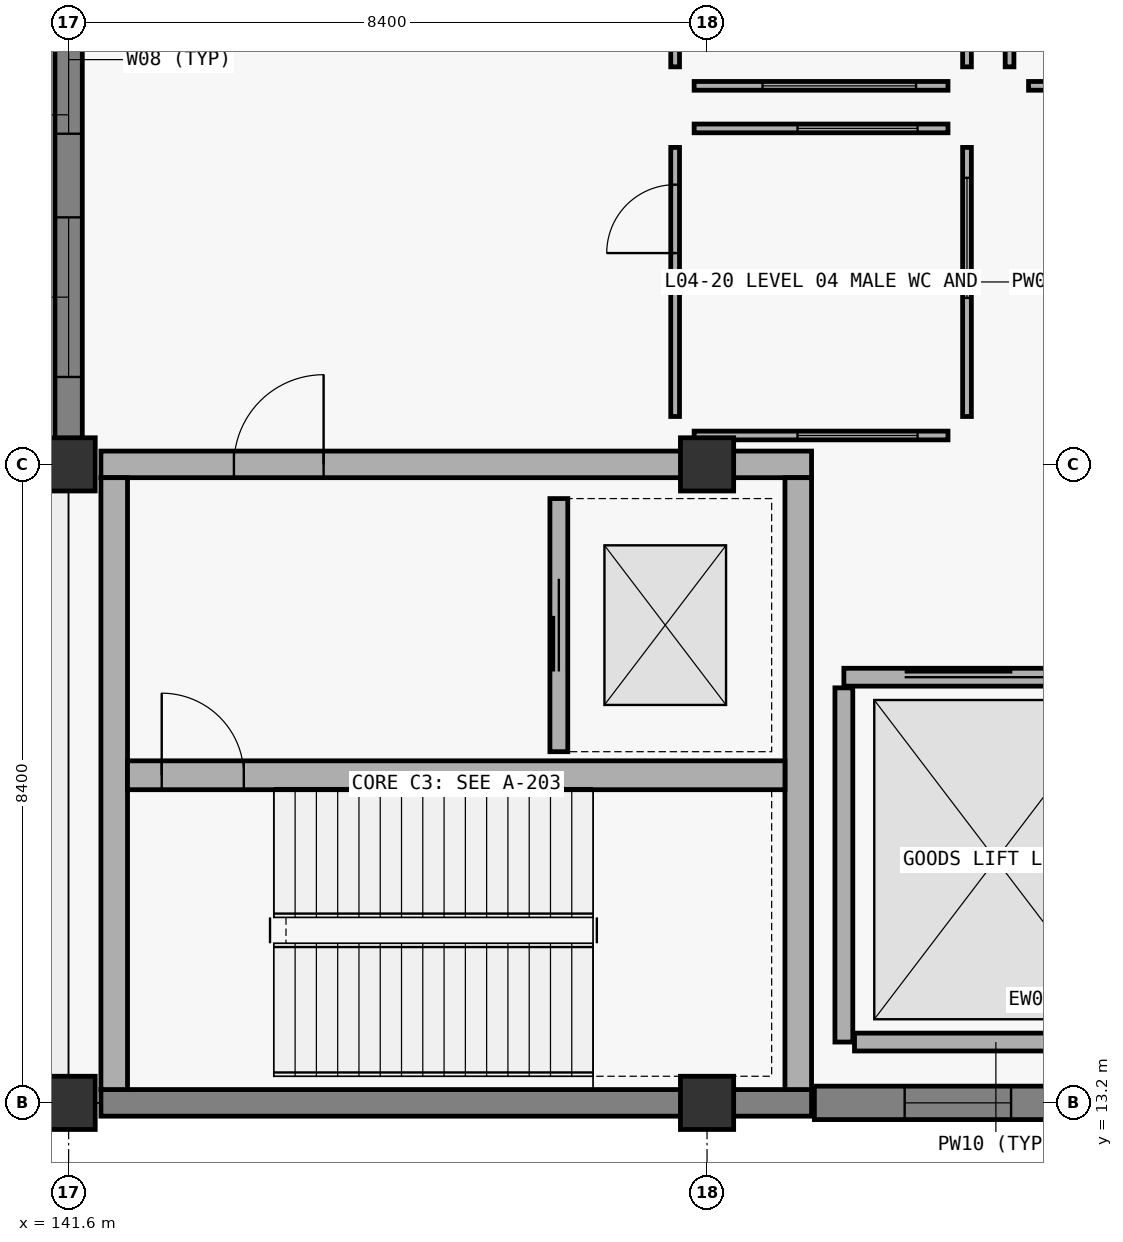
"""IFC4 building model, lengths in metres.
Left out: names, types, materials, properties, quantities, classifications, styles, units other than length and angle.
Written with IfcOpenShell. Run it as: python <this file> out.ifc"""

import sys

from ifc_helpers import new_model, si_unit, direction, frame, frame_2d, origin, origin_2d, place, context, subcontext, project, spatial, rectangle, extrude, element, fill, save


model = new_model("IFC4")
c1 = context("Model", 3, precision=1e-05, world=origin(), true_north=direction((0.0, 1.0)))
c2 = subcontext(c1, "Body", "Model", "MODEL_VIEW")
j1 = project(units=[si_unit("LENGTHUNIT", "METRE"), si_unit("PLANEANGLEUNIT", "RADIAN")], contexts=[c1])
p1 = place(None, origin())
s1 = spatial("IfcSite", under=j1, at=p1, CompositionType="ELEMENT")
p2 = place(p1, origin())
s2 = spatial("IfcBuilding", under=s1, at=p2, CompositionType="ELEMENT")
p3 = place(p2, frame((0.0, 0.0, 20.7)))
s3 = spatial("IfcBuildingStorey", under=s2, at=p3, CompositionType="ELEMENT", Elevation=20.7)
for number, where, z_axis, x_axis in (
    (1, (141.6, 13.2, 0.0), (0.0, 0.0, 1.0), (1.0, 0.0, 0.0)),
    (2, (141.6, 21.6, 0.0), (0.0, 0.0, 1.0), (1.0, 0.0, 0.0)),
    (3, (150.0, 13.2, 0.0), (0.0, 0.0, 1.0), (1.0, 0.0, 0.0)),
    (4, (150.0, 21.6, 0.0), (0.0, 0.0, 1.0), (1.0, 0.0, 0.0)),
):
    element("IfcColumn", number, at=place(p3, frame(where, z_axis=z_axis, x_axis=x_axis)), inside=s3, PredefinedType="COLUMN", context=c2, shape_type="SweptSolid", body=[
        extrude(rectangle(XDim=0.7, YDim=0.7, at=origin_2d()), origin(), (0.0, 0.0, 1.0), 5.7),
    ])
p4 = place(p3, frame((151.375, 13.2, 0.0), z_axis=(0.0, 0.0, 1.0), x_axis=(-1.0, 0.0, 0.0)))
e5 = element("IfcWall", 5, at=p4, inside=s3, PredefinedType="SHEAR", context=c2, shape_type="SweptSolid", body=[
    extrude(rectangle(XDim=9.35, YDim=0.35, at=frame_2d((4.675, 0.0))), origin(), (0.0, 0.0, 1.0), 5.7),
])
p5 = place(p3, frame((142.025, 21.6, 0.0), z_axis=(0.0, 0.0, 1.0), x_axis=(1.0, 0.0, 0.0)))
e6 = element("IfcWall", 6, at=p5, inside=s3, PredefinedType="SHEAR", context=c2, shape_type="SweptSolid", body=[
    extrude(rectangle(XDim=9.35, YDim=0.35, at=frame_2d((4.675, 0.0))), origin(), (0.0, 0.0, 1.0), 5.7),
])
p6 = place(p5, frame((1.75, 0.0, 0.0)))
e7 = element("IfcOpeningElement", 7, at=p6, cuts=e6, PredefinedType="OPENING", context=c2, shape_type="SweptSolid", body=[
    extrude(rectangle(XDim=1.18, YDim=2.24, at=frame_2d((0.59, 1.12))), frame((0.0, 0.185, 0.0), z_axis=(0.0, -1.0, 0.0), x_axis=(1.0, 0.0, 0.0)), (0.0, 0.0, 1.0), 0.37),
])
for number, where, z_axis, x_axis in (
    (8, (142.2, 13.375, 0.0), (0.0, 0.0, 1.0), (0.0, 1.0, 0.0)),
    (9, (151.2, 13.375, 0.0), (0.0, 0.0, 1.0), (0.0, 1.0, 0.0)),
):
    element("IfcWall", number, at=place(p3, frame(where, z_axis=z_axis, x_axis=x_axis)), inside=s3, PredefinedType="SHEAR", context=c2, shape_type="SweptSolid", body=[
        extrude(rectangle(XDim=8.05, YDim=0.35, at=frame_2d((4.025, 0.0))), origin(), (0.0, 0.0, 1.0), 5.7),
    ])
p7 = place(p3, frame((142.375, 17.51, 0.0), z_axis=(0.0, 0.0, 1.0), x_axis=(1.0, 0.0, 0.0)))
e10 = element("IfcWall", 10, at=p7, inside=s3, PredefinedType="SHEAR", context=c2, shape_type="SweptSolid", body=[
    extrude(rectangle(XDim=8.65, YDim=0.38, at=frame_2d((4.325, 0.0))), origin(), (0.0, 0.0, 1.0), 5.7),
])
p8 = place(p7, frame((0.45, 0.0, 0.0)))
e11 = element("IfcOpeningElement", 11, at=p8, cuts=e10, PredefinedType="OPENING", context=c2, shape_type="SweptSolid", body=[
    extrude(rectangle(XDim=1.08, YDim=2.18, at=frame_2d((0.54, 1.09))), frame((0.0, 0.2, 0.0), z_axis=(0.0, -1.0, 0.0), x_axis=(1.0, 0.0, 0.0)), (0.0, 0.0, 1.0), 0.4),
])
p9 = place(p3, frame((151.412, 13.2, 0.0), z_axis=(0.0, 0.0, 1.0), x_axis=(1.0, 0.0, 0.0)))
e12 = element("IfcWall", 12, at=p9, inside=s3, PredefinedType="SOLIDWALL", context=c2, shape_type="SweptSolid", body=[
    extrude(rectangle(XDim=6.636, YDim=0.44, at=frame_2d((3.318, 0.0))), origin(), (0.0, 0.0, 1.0), 4.66),
])
p10 = place(p9, frame((1.188, 0.0, 0.9)))
e13 = element("IfcOpeningElement", 13, at=p10, cuts=e12, PredefinedType="OPENING", context=c2, shape_type="SweptSolid", body=[
    extrude(rectangle(XDim=1.4, YDim=2.2, at=frame_2d((0.7, 1.1))), frame((0.0, 0.23, 0.0), z_axis=(0.0, -1.0, 0.0), x_axis=(1.0, 0.0, 0.0)), (0.0, 0.0, 1.0), 0.46),
])
p11 = place(p9, frame((4.388, 0.0, 0.9)))
e14 = element("IfcOpeningElement", 14, at=p11, cuts=e12, PredefinedType="OPENING", context=c2, shape_type="SweptSolid", body=[
    extrude(rectangle(XDim=1.25, YDim=2.05, at=frame_2d((0.625, 1.025))), frame((0.0, 0.23, 0.0), z_axis=(0.0, -1.0, 0.0), x_axis=(1.0, 0.0, 0.0)), (0.0, 0.0, 1.0), 0.46),
])
p12 = place(p3, frame((141.6, 21.55, 0.0), z_axis=(0.0, 0.0, 1.0), x_axis=(0.0, 1.0, 0.0)))
e15 = element("IfcWall", 15, at=p12, inside=s3, PredefinedType="SOLIDWALL", context=c2, shape_type="SweptSolid", body=[
    extrude(rectangle(XDim=9.298, YDim=0.36, at=frame_2d((4.649, 0.0))), origin(), (0.0, 0.0, 1.0), 4.66),
])
p13 = place(p12, frame((1.2, 0.0, 0.85)))
e16 = element("IfcOpeningElement", 16, at=p13, cuts=e15, PredefinedType="OPENING", context=c2, shape_type="SweptSolid", body=[
    extrude(rectangle(XDim=2.1, YDim=2.4, at=frame_2d((1.05, 1.2))), frame((0.0, 0.19, 0.0), z_axis=(0.0, -1.0, 0.0), x_axis=(1.0, 0.0, 0.0)), (0.0, 0.0, 1.0), 0.38),
])
p14 = place(p12, frame((4.4, 0.0, 0.85)))
e17 = element("IfcOpeningElement", 17, at=p14, cuts=e15, PredefinedType="OPENING", context=c2, shape_type="SweptSolid", body=[
    extrude(rectangle(XDim=1.95, YDim=2.3, at=frame_2d((0.975, 1.15))), frame((0.0, 0.19, 0.0), z_axis=(0.0, -1.0, 0.0), x_axis=(1.0, 0.0, 0.0)), (0.0, 0.0, 1.0), 0.38),
])
p15 = place(p3, frame((148.05, 17.82, 0.0), z_axis=(0.0, 0.0, 1.0), x_axis=(0.0, 1.0, 0.0)))
e18 = element("IfcWall", 18, at=p15, inside=s3, PredefinedType="PARTITIONING", context=c2, shape_type="SweptSolid", body=[
    extrude(rectangle(XDim=3.33, YDim=0.235, at=frame_2d((1.665, 0.0))), origin(), (0.0, 0.0, 1.0), 4.98),
])
p16 = place(p15, frame((1.055, 0.0, 0.0)))
e19 = element("IfcOpeningElement", 19, at=p16, cuts=e18, PredefinedType="OPENING", context=c2, shape_type="SweptSolid", body=[
    extrude(rectangle(XDim=1.22, YDim=2.24, at=frame_2d((0.61, 1.12))), frame((0.0, 0.127, 0.0), z_axis=(0.0, -1.0, 0.0), x_axis=(1.0, 0.0, 0.0)), (0.0, 0.0, 1.0), 0.255),
])
p17 = place(p3, frame((151.8, 18.8, 0.0), z_axis=(0.0, 0.0, 1.0), x_axis=(1.0, 0.0, 0.0)))
e20 = element("IfcWall", 20, at=p17, inside=s3, PredefinedType="PARTITIONING", context=c2, shape_type="SweptSolid", body=[
    extrude(rectangle(XDim=4.0, YDim=0.235, at=frame_2d((2.0, 0.0))), origin(), (0.0, 0.0, 1.0), 4.98),
])
p18 = place(p17, frame((0.8, 0.0, 0.0)))
e21 = element("IfcOpeningElement", 21, at=p18, cuts=e20, PredefinedType="OPENING", context=c2, shape_type="SweptSolid", body=[
    extrude(rectangle(XDim=2.36, YDim=2.78, at=frame_2d((1.18, 1.39))), frame((0.0, 0.127, 0.0), z_axis=(0.0, -1.0, 0.0), x_axis=(1.0, 0.0, 0.0)), (0.0, 0.0, 1.0), 0.255),
])
p19 = place(p3, frame((151.8, 14.0, 0.0), z_axis=(0.0, 0.0, 1.0), x_axis=(0.0, 1.0, 0.0)))
e22 = element("IfcWall", 22, at=p19, inside=s3, PredefinedType="PARTITIONING", context=c2, shape_type="SweptSolid", body=[
    extrude(rectangle(XDim=4.66, YDim=0.235, at=frame_2d((2.33, 0.0))), origin(), (0.0, 0.0, 1.0), 4.98),
])
p20 = place(p3, frame((151.94, 14.0, 0.0), z_axis=(0.0, 0.0, 1.0), x_axis=(1.0, 0.0, 0.0)))
e23 = element("IfcWall", 23, at=p20, inside=s3, PredefinedType="PARTITIONING", context=c2, shape_type="SweptSolid", body=[
    extrude(rectangle(XDim=3.72, YDim=0.235, at=frame_2d((1.86, 0.0))), origin(), (0.0, 0.0, 1.0), 4.98),
])
p21 = place(p3, frame((149.58, 22.23, 0.0), z_axis=(0.0, 0.0, 1.0), x_axis=(0.0, 1.0, 0.0)))
e24 = element("IfcWall", 24, at=p21, inside=s3, PredefinedType="PARTITIONING", context=c2, shape_type="SweptSolid", body=[
    extrude(rectangle(XDim=3.54, YDim=0.115, at=frame_2d((1.77, 0.0))), origin(), (0.0, 0.0, 1.0), 4.98),
])
p22 = place(p21, frame((2.15, 0.0, 0.0)))
e25 = element("IfcOpeningElement", 25, at=p22, cuts=e24, PredefinedType="OPENING", context=c2, shape_type="SweptSolid", body=[
    extrude(rectangle(XDim=0.9, YDim=2.1, at=frame_2d((0.45, 1.05))), frame((0.0, 0.067, 0.0), z_axis=(0.0, -1.0, 0.0), x_axis=(1.0, 0.0, 0.0)), (0.0, 0.0, 1.0), 0.135),
])
p23 = place(p3, frame((149.83, 21.98, 0.0), z_axis=(0.0, 0.0, 1.0), x_axis=(1.0, 0.0, 0.0)))
e26 = element("IfcWall", 26, at=p23, inside=s3, PredefinedType="PARTITIONING", context=c2, shape_type="SweptSolid", body=[
    extrude(rectangle(XDim=3.34, YDim=0.115, at=frame_2d((1.67, 0.0))), origin(), (0.0, 0.0, 1.0), 4.66),
])
p24 = place(p23, frame((1.36, 0.0, 0.9)))
e27 = element("IfcOpeningElement", 27, at=p24, cuts=e26, PredefinedType="OPENING", context=c2, shape_type="SweptSolid", body=[
    extrude(rectangle(XDim=1.58, YDim=1.24, at=frame_2d((0.79, 0.62))), frame((0.0, 0.067, 0.0), z_axis=(0.0, -1.0, 0.0), x_axis=(1.0, 0.0, 0.0)), (0.0, 0.0, 1.0), 0.135),
])
p25 = place(p3, frame((149.83, 26.02, 0.0), z_axis=(0.0, 0.0, 1.0), x_axis=(1.0, 0.0, 0.0)))
e28 = element("IfcWall", 28, at=p25, inside=s3, PredefinedType="PARTITIONING", context=c2, shape_type="SweptSolid", body=[
    extrude(rectangle(XDim=3.34, YDim=0.115, at=frame_2d((1.67, 0.0))), origin(), (0.0, 0.0, 1.0), 4.66),
])
p26 = place(p25, frame((1.36, 0.0, 0.9)))
e29 = element("IfcOpeningElement", 29, at=p26, cuts=e28, PredefinedType="OPENING", context=c2, shape_type="SweptSolid", body=[
    extrude(rectangle(XDim=1.58, YDim=1.24, at=frame_2d((0.79, 0.62))), frame((0.0, 0.067, 0.0), z_axis=(0.0, -1.0, 0.0), x_axis=(1.0, 0.0, 0.0)), (0.0, 0.0, 1.0), 0.135),
])
p27 = place(p3, frame((153.42, 22.23, 0.0), z_axis=(0.0, 0.0, 1.0), x_axis=(0.0, 1.0, 0.0)))
e30 = element("IfcWall", 30, at=p27, inside=s3, PredefinedType="PARTITIONING", context=c2, shape_type="SweptSolid", body=[
    extrude(rectangle(XDim=3.54, YDim=0.115, at=frame_2d((1.77, 0.0))), origin(), (0.0, 0.0, 1.0), 4.98),
])
p28 = place(p27, frame((1.56, 0.0, 0.9)))
e31 = element("IfcOpeningElement", 31, at=p28, cuts=e30, PredefinedType="OPENING", context=c2, shape_type="SweptSolid", body=[
    extrude(rectangle(XDim=1.58, YDim=1.24, at=frame_2d((0.79, 0.62))), frame((0.0, 0.067, 0.0), z_axis=(0.0, -1.0, 0.0), x_axis=(1.0, 0.0, 0.0)), (0.0, 0.0, 1.0), 0.135),
])
p29 = place(p3, frame((149.58, 26.83, 0.0), z_axis=(0.0, 0.0, 1.0), x_axis=(0.0, 1.0, 0.0)))
e32 = element("IfcWall", 32, at=p29, inside=s3, PredefinedType="PARTITIONING", context=c2, shape_type="SweptSolid", body=[
    extrude(rectangle(XDim=3.74, YDim=0.115, at=frame_2d((1.87, 0.0))), origin(), (0.0, 0.0, 1.0), 4.98),
])
p30 = place(p29, frame((0.4, 0.0, 0.0)))
e33 = element("IfcOpeningElement", 33, at=p30, cuts=e32, PredefinedType="OPENING", context=c2, shape_type="SweptSolid", body=[
    extrude(rectangle(XDim=0.9, YDim=2.1, at=frame_2d((0.45, 1.05))), frame((0.0, 0.067, 0.0), z_axis=(0.0, -1.0, 0.0), x_axis=(1.0, 0.0, 0.0)), (0.0, 0.0, 1.0), 0.135),
])
p31 = place(p3, frame((149.83, 26.58, 0.0), z_axis=(0.0, 0.0, 1.0), x_axis=(1.0, 0.0, 0.0)))
e34 = element("IfcWall", 34, at=p31, inside=s3, PredefinedType="PARTITIONING", context=c2, shape_type="SweptSolid", body=[
    extrude(rectangle(XDim=3.34, YDim=0.115, at=frame_2d((1.67, 0.0))), origin(), (0.0, 0.0, 1.0), 4.66),
])
p32 = place(p31, frame((0.9, 0.0, 0.9)))
e35 = element("IfcOpeningElement", 35, at=p32, cuts=e34, PredefinedType="OPENING", context=c2, shape_type="SweptSolid", body=[
    extrude(rectangle(XDim=2.02, YDim=1.32, at=frame_2d((1.01, 0.66))), frame((0.0, 0.067, 0.0), z_axis=(0.0, -1.0, 0.0), x_axis=(1.0, 0.0, 0.0)), (0.0, 0.0, 1.0), 0.135),
])
p33 = place(p3, frame((153.42, 26.83, 0.0), z_axis=(0.0, 0.0, 1.0), x_axis=(0.0, 1.0, 0.0)))
e36 = element("IfcWall", 36, at=p33, inside=s3, PredefinedType="PARTITIONING", context=c2, shape_type="SweptSolid", body=[
    extrude(rectangle(XDim=3.74, YDim=0.115, at=frame_2d((1.87, 0.0))), origin(), (0.0, 0.0, 1.0), 4.98),
])
p34 = place(p33, frame((0.4, 0.0, 0.9)))
e37 = element("IfcOpeningElement", 37, at=p34, cuts=e36, PredefinedType="OPENING", context=c2, shape_type="SweptSolid", body=[
    extrude(rectangle(XDim=2.02, YDim=1.32, at=frame_2d((1.01, 0.66))), frame((0.0, 0.067, 0.0), z_axis=(0.0, -1.0, 0.0), x_axis=(1.0, 0.0, 0.0)), (0.0, 0.0, 1.0), 0.135),
])
p35 = place(p3, frame((154.23, 26.58, 0.0), z_axis=(0.0, 0.0, 1.0), x_axis=(1.0, 0.0, 0.0)))
e38 = element("IfcWall", 38, at=p35, inside=s3, PredefinedType="PARTITIONING", context=c2, shape_type="SweptSolid", body=[
    extrude(rectangle(XDim=3.34, YDim=0.115, at=frame_2d((1.67, 0.0))), origin(), (0.0, 0.0, 1.0), 4.98),
])
p36 = place(p35, frame((0.4, 0.0, 0.9)))
e39 = element("IfcOpeningElement", 39, at=p36, cuts=e38, PredefinedType="OPENING", context=c2, shape_type="SweptSolid", body=[
    extrude(rectangle(XDim=1.48, YDim=1.35, at=frame_2d((0.74, 0.675))), frame((0.0, 0.067, 0.0), z_axis=(0.0, -1.0, 0.0), x_axis=(1.0, 0.0, 0.0)), (0.0, 0.0, 1.0), 0.135),
])
p37 = place(p3, frame((153.98, 26.83, 0.0), z_axis=(0.0, 0.0, 1.0), x_axis=(0.0, 1.0, 0.0)))
e40 = element("IfcWall", 40, at=p37, inside=s3, PredefinedType="PARTITIONING", context=c2, shape_type="SweptSolid", body=[
    extrude(rectangle(XDim=3.74, YDim=0.115, at=frame_2d((1.87, 0.0))), origin(), (0.0, 0.0, 1.0), 4.98),
])
p38 = place(p37, frame((0.4, 0.0, 0.9)))
e41 = element("IfcOpeningElement", 41, at=p38, cuts=e40, PredefinedType="OPENING", context=c2, shape_type="SweptSolid", body=[
    extrude(rectangle(XDim=1.48, YDim=1.35, at=frame_2d((0.74, 0.675))), frame((0.0, 0.067, 0.0), z_axis=(0.0, -1.0, 0.0), x_axis=(1.0, 0.0, 0.0)), (0.0, 0.0, 1.0), 0.135),
])
p39 = place(p10, origin())
e42 = element("IfcWindow", 42, at=p39, inside=s3, PartitioningType="SINGLE_PANEL", PredefinedType="WINDOW", context=c2, shape_type="SweptSolid", body=[
    extrude(rectangle(XDim=1.4, YDim=2.2, at=frame_2d((0.7, 1.1))), frame((0.0, 0.03, 0.0), z_axis=(0.0, -1.0, 0.0), x_axis=(1.0, 0.0, 0.0)), (0.0, 0.0, 1.0), 0.06),
])
fill(e13, e42)
p40 = place(p13, origin())
e43 = element("IfcWindow", 43, at=p40, inside=s3, PartitioningType="SINGLE_PANEL", PredefinedType="WINDOW", context=c2, shape_type="SweptSolid", body=[
    extrude(rectangle(XDim=2.1, YDim=2.4, at=frame_2d((1.05, 1.2))), frame((0.0, 0.03, 0.0), z_axis=(0.0, -1.0, 0.0), x_axis=(1.0, 0.0, 0.0)), (0.0, 0.0, 1.0), 0.06),
])
fill(e16, e43)
p41 = place(p14, origin())
e44 = element("IfcWindow", 44, at=p41, inside=s3, PartitioningType="SINGLE_PANEL", PredefinedType="WINDOW", context=c2, shape_type="SweptSolid", body=[
    extrude(rectangle(XDim=1.95, YDim=2.3, at=frame_2d((0.975, 1.15))), frame((0.0, 0.03, 0.0), z_axis=(0.0, -1.0, 0.0), x_axis=(1.0, 0.0, 0.0)), (0.0, 0.0, 1.0), 0.06),
])
fill(e17, e44)
p42 = place(p8, origin())
e45 = element("IfcDoor", 45, at=p42, inside=s3, OperationType="SINGLE_SWING_LEFT", PredefinedType="DOOR", context=c2, shape_type="SweptSolid", body=[
    extrude(rectangle(XDim=1.08, YDim=2.18, at=frame_2d((0.54, 1.09))), frame((0.0, 0.025, 0.0), z_axis=(0.0, -1.0, 0.0), x_axis=(1.0, 0.0, 0.0)), (0.0, 0.0, 1.0), 0.05),
])
fill(e11, e45)
p43 = place(p6, origin())
e46 = element("IfcDoor", 46, at=p43, inside=s3, OperationType="SINGLE_SWING_RIGHT", PredefinedType="DOOR", context=c2, shape_type="SweptSolid", body=[
    extrude(rectangle(XDim=1.18, YDim=2.24, at=frame_2d((0.59, 1.12))), frame((0.0, 0.025, 0.0), z_axis=(0.0, -1.0, 0.0), x_axis=(1.0, 0.0, 0.0)), (0.0, 0.0, 1.0), 0.05),
])
fill(e7, e46)
p44 = place(p16, origin())
e47 = element("IfcDoor", 47, at=p44, inside=s3, OperationType="SLIDING_TO_RIGHT", PredefinedType="DOOR", context=c2, shape_type="SweptSolid", body=[
    extrude(rectangle(XDim=1.22, YDim=2.24, at=frame_2d((0.61, 1.12))), frame((0.0, 0.025, 0.0), z_axis=(0.0, -1.0, 0.0), x_axis=(1.0, 0.0, 0.0)), (0.0, 0.0, 1.0), 0.05),
])
fill(e19, e47)
p45 = place(p18, origin())
e48 = element("IfcDoor", 48, at=p45, inside=s3, OperationType="SLIDING_TO_LEFT", PredefinedType="DOOR", context=c2, shape_type="SweptSolid", body=[
    extrude(rectangle(XDim=2.36, YDim=2.78, at=frame_2d((1.18, 1.39))), frame((0.0, 0.025, 0.0), z_axis=(0.0, -1.0, 0.0), x_axis=(1.0, 0.0, 0.0)), (0.0, 0.0, 1.0), 0.05),
])
fill(e21, e48)
p46 = place(p22, origin())
e49 = element("IfcDoor", 49, at=p46, inside=s3, OperationType="SINGLE_SWING_LEFT", PredefinedType="DOOR", context=c2, shape_type="SweptSolid", body=[
    extrude(rectangle(XDim=0.9, YDim=2.1, at=frame_2d((0.45, 1.05))), frame((0.0, 0.025, 0.0), z_axis=(0.0, -1.0, 0.0), x_axis=(1.0, 0.0, 0.0)), (0.0, 0.0, 1.0), 0.05),
])
fill(e25, e49)
p47 = place(p24, origin())
e50 = element("IfcWindow", 50, at=p47, inside=s3, PartitioningType="SINGLE_PANEL", PredefinedType="WINDOW", context=c2, shape_type="SweptSolid", body=[
    extrude(rectangle(XDim=1.58, YDim=1.24, at=frame_2d((0.79, 0.62))), frame((0.0, 0.03, 0.0), z_axis=(0.0, -1.0, 0.0), x_axis=(1.0, 0.0, 0.0)), (0.0, 0.0, 1.0), 0.06),
])
fill(e27, e50)
p48 = place(p26, origin())
e51 = element("IfcWindow", 51, at=p48, inside=s3, PartitioningType="SINGLE_PANEL", PredefinedType="WINDOW", context=c2, shape_type="SweptSolid", body=[
    extrude(rectangle(XDim=1.58, YDim=1.24, at=frame_2d((0.79, 0.62))), frame((0.0, 0.03, 0.0), z_axis=(0.0, -1.0, 0.0), x_axis=(1.0, 0.0, 0.0)), (0.0, 0.0, 1.0), 0.06),
])
fill(e29, e51)
p49 = place(p28, origin())
e52 = element("IfcWindow", 52, at=p49, inside=s3, PartitioningType="SINGLE_PANEL", PredefinedType="WINDOW", context=c2, shape_type="SweptSolid", body=[
    extrude(rectangle(XDim=1.58, YDim=1.24, at=frame_2d((0.79, 0.62))), frame((0.0, 0.03, 0.0), z_axis=(0.0, -1.0, 0.0), x_axis=(1.0, 0.0, 0.0)), (0.0, 0.0, 1.0), 0.06),
])
fill(e31, e52)
p50 = place(p32, origin())
e53 = element("IfcWindow", 53, at=p50, inside=s3, PartitioningType="SINGLE_PANEL", PredefinedType="WINDOW", context=c2, shape_type="SweptSolid", body=[
    extrude(rectangle(XDim=2.02, YDim=1.32, at=frame_2d((1.01, 0.66))), frame((0.0, 0.03, 0.0), z_axis=(0.0, -1.0, 0.0), x_axis=(1.0, 0.0, 0.0)), (0.0, 0.0, 1.0), 0.06),
])
fill(e35, e53)
save(model, sys.argv[1])
